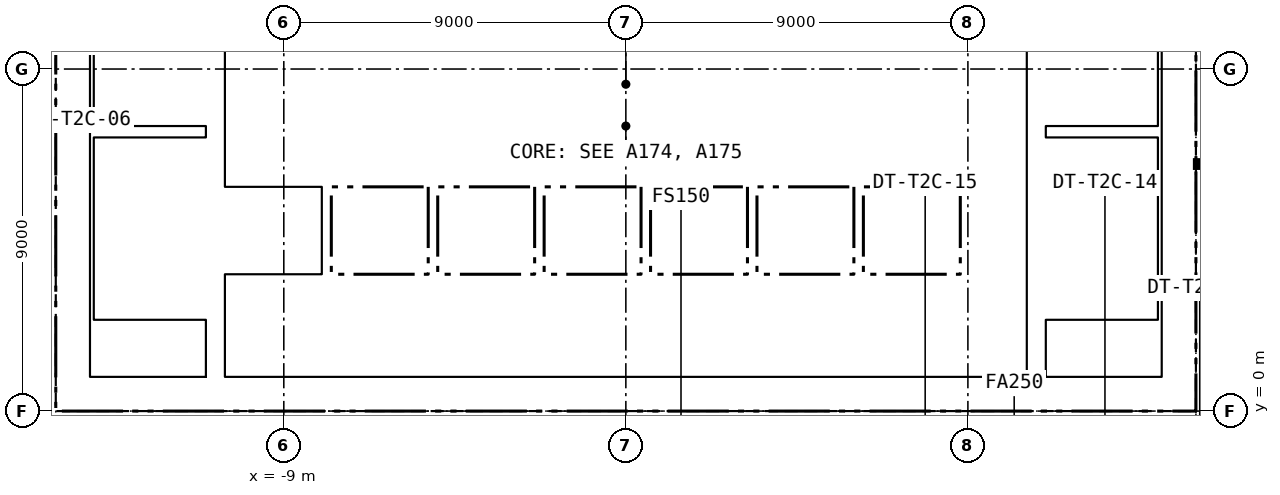
"""IFC4 building model, lengths in metres.
Left out: names, types, materials, properties, quantities, classifications, styles, units other than length and angle.
Written with IfcOpenShell. Run it as: python <this file> out.ifc"""

import sys

from ifc_helpers import new_model, si_unit, direction, frame, frame_2d, origin, place, context, subcontext, project, spatial, rectangle, extrude, element, fill, save


model = new_model("IFC4")
c1 = context("Model", 3, precision=1e-05, world=origin(), true_north=direction((0.0, 1.0)))
c2 = subcontext(c1, "Body", "Model", "MODEL_VIEW")
j1 = project(units=[si_unit("LENGTHUNIT", "METRE"), si_unit("PLANEANGLEUNIT", "RADIAN")], contexts=[c1])
p1 = place(None, origin())
s1 = spatial("IfcSite", under=j1, at=p1, CompositionType="ELEMENT")
p2 = place(p1, origin())
s2 = spatial("IfcBuilding", under=s1, at=p2, CompositionType="ELEMENT")
p3 = place(p2, frame((0.0, 0.0, 102.55)))
s3 = spatial("IfcBuildingStorey", under=s2, at=p3, CompositionType="ELEMENT", Elevation=102.55)
p4 = place(p3, frame((-15.0, 0.45, -0.15), z_axis=(0.0, 0.0, 1.0), x_axis=(1.0, 0.0, 0.0)))
e1 = element("IfcWall", 1, at=p4, inside=s3, PredefinedType="SOLIDWALL", context=c2, shape_type="SweptSolid", body=[
    extrude(rectangle(XDim=30.0, YDim=0.9, at=frame_2d((15.0, 0.0))), origin(), (0.0, 0.0, 1.0), 3.65),
])
p5 = place(p4, frame((5.8, 0.0, 0.15)))
e2 = element("IfcOpeningElement", 2, at=p5, cuts=e1, PredefinedType="OPENING", context=c2, shape_type="SweptSolid", body=[
    extrude(rectangle(XDim=2.4, YDim=2.4, at=frame_2d((1.2, 1.2))), frame((0.0, 0.46, 0.0), z_axis=(0.0, -1.0, 0.0), x_axis=(1.0, 0.0, 0.0)), (0.0, 0.0, 1.0), 0.92),
])
p6 = place(p4, frame((13.8, 0.0, 0.15)))
e3 = element("IfcOpeningElement", 3, at=p6, cuts=e1, PredefinedType="OPENING", context=c2, shape_type="SweptSolid", body=[
    extrude(rectangle(XDim=2.4, YDim=2.4, at=frame_2d((1.2, 1.2))), frame((0.0, 0.46, 0.0), z_axis=(0.0, -1.0, 0.0), x_axis=(1.0, 0.0, 0.0)), (0.0, 0.0, 1.0), 0.92),
])
p7 = place(p4, frame((21.8, 0.0, 0.15)))
e4 = element("IfcOpeningElement", 4, at=p7, cuts=e1, PredefinedType="OPENING", context=c2, shape_type="SweptSolid", body=[
    extrude(rectangle(XDim=2.4, YDim=2.4, at=frame_2d((1.2, 1.2))), frame((0.0, 0.46, 0.0), z_axis=(0.0, -1.0, 0.0), x_axis=(1.0, 0.0, 0.0)), (0.0, 0.0, 1.0), 0.92),
])
p8 = place(p4, frame((1.5, 0.0, 0.15)))
e5 = element("IfcOpeningElement", 5, at=p8, cuts=e1, PredefinedType="OPENING", context=c2, shape_type="SweptSolid", body=[
    extrude(rectangle(XDim=1.2, YDim=2.1, at=frame_2d((0.6, 1.05))), frame((0.0, 0.46, 0.0), z_axis=(0.0, -1.0, 0.0), x_axis=(1.0, 0.0, 0.0)), (0.0, 0.0, 1.0), 0.92),
])
p9 = place(p4, frame((27.3, 0.0, 0.15)))
e6 = element("IfcOpeningElement", 6, at=p9, cuts=e1, PredefinedType="OPENING", context=c2, shape_type="SweptSolid", body=[
    extrude(rectangle(XDim=1.2, YDim=2.1, at=frame_2d((0.6, 1.05))), frame((0.0, 0.46, 0.0), z_axis=(0.0, -1.0, 0.0), x_axis=(1.0, 0.0, 0.0)), (0.0, 0.0, 1.0), 0.92),
])
for number, where, z_axis, x_axis in (
    (7, (-14.55, 0.9, -0.15), (0.0, 0.0, 1.0), (0.0, 1.0, 0.0)),
    (8, (14.55, 0.9, -0.15), (0.0, 0.0, 1.0), (0.0, 1.0, 0.0)),
):
    element("IfcWall", number, at=place(p3, frame(where, z_axis=z_axis, x_axis=x_axis)), inside=s3, PredefinedType="SOLIDWALL", context=c2, shape_type="SweptSolid", body=[
        extrude(rectangle(XDim=13.2, YDim=0.9, at=frame_2d((6.6, 0.0))), origin(), (0.0, 0.0, 1.0), 3.65),
    ])
for number, where, z_axis, x_axis in (
    (9, (-10.8, 0.9, -0.15), (0.0, 0.0, 1.0), (0.0, 1.0, 0.0)),
    (10, (10.8, 0.9, -0.15), (0.0, 0.0, 1.0), (0.0, 1.0, 0.0)),
):
    element("IfcWall", number, at=place(p3, frame(where, z_axis=z_axis, x_axis=x_axis)), inside=s3, PredefinedType="SOLIDWALL", context=c2, shape_type="SweptSolid", body=[
        extrude(rectangle(XDim=13.2, YDim=0.5, at=frame_2d((6.6, 0.0))), origin(), (0.0, 0.0, 1.0), 3.65),
    ])
p10 = place(p3, frame((-10.55, 3.5, 0.0), z_axis=(0.0, 0.0, 1.0), x_axis=(1.0, 0.0, 0.0)))
e11 = element("IfcWall", 11, at=p10, inside=s3, PredefinedType="PARTITIONING", context=c2, shape_type="SweptSolid", body=[
    extrude(rectangle(XDim=21.1, YDim=0.2, at=frame_2d((10.55, 0.0))), origin(), (0.0, 0.0, 1.0), 3.5),
])
p11 = place(p10, frame((0.675, 0.0, 0.0)))
e12 = element("IfcOpeningElement", 12, at=p11, cuts=e11, PredefinedType="OPENING", context=c2, shape_type="SweptSolid", body=[
    extrude(rectangle(XDim=1.2, YDim=2.1, at=frame_2d((0.6, 1.05))), frame((0.0, 0.11, 0.0), z_axis=(0.0, -1.0, 0.0), x_axis=(1.0, 0.0, 0.0)), (0.0, 0.0, 1.0), 0.22),
])
p12 = place(p10, frame((3.475, 0.0, 0.0)))
e13 = element("IfcOpeningElement", 13, at=p12, cuts=e11, PredefinedType="OPENING", context=c2, shape_type="SweptSolid", body=[
    extrude(rectangle(XDim=1.2, YDim=2.1, at=frame_2d((0.6, 1.05))), frame((0.0, 0.11, 0.0), z_axis=(0.0, -1.0, 0.0), x_axis=(1.0, 0.0, 0.0)), (0.0, 0.0, 1.0), 0.22),
])
p13 = place(p10, frame((6.275, 0.0, 0.0)))
e14 = element("IfcOpeningElement", 14, at=p13, cuts=e11, PredefinedType="OPENING", context=c2, shape_type="SweptSolid", body=[
    extrude(rectangle(XDim=1.2, YDim=2.1, at=frame_2d((0.6, 1.05))), frame((0.0, 0.11, 0.0), z_axis=(0.0, -1.0, 0.0), x_axis=(1.0, 0.0, 0.0)), (0.0, 0.0, 1.0), 0.22),
])
p14 = place(p10, frame((9.075, 0.0, 0.0)))
e15 = element("IfcOpeningElement", 15, at=p14, cuts=e11, PredefinedType="OPENING", context=c2, shape_type="SweptSolid", body=[
    extrude(rectangle(XDim=1.2, YDim=2.1, at=frame_2d((0.6, 1.05))), frame((0.0, 0.11, 0.0), z_axis=(0.0, -1.0, 0.0), x_axis=(1.0, 0.0, 0.0)), (0.0, 0.0, 1.0), 0.22),
])
p15 = place(p10, frame((11.875, 0.0, 0.0)))
e16 = element("IfcOpeningElement", 16, at=p15, cuts=e11, PredefinedType="OPENING", context=c2, shape_type="SweptSolid", body=[
    extrude(rectangle(XDim=1.2, YDim=2.1, at=frame_2d((0.6, 1.05))), frame((0.0, 0.11, 0.0), z_axis=(0.0, -1.0, 0.0), x_axis=(1.0, 0.0, 0.0)), (0.0, 0.0, 1.0), 0.22),
])
p16 = place(p10, frame((14.675, 0.0, 0.0)))
e17 = element("IfcOpeningElement", 17, at=p16, cuts=e11, PredefinedType="OPENING", context=c2, shape_type="SweptSolid", body=[
    extrude(rectangle(XDim=1.2, YDim=2.1, at=frame_2d((0.6, 1.05))), frame((0.0, 0.11, 0.0), z_axis=(0.0, -1.0, 0.0), x_axis=(1.0, 0.0, 0.0)), (0.0, 0.0, 1.0), 0.22),
])
p17 = place(p10, frame((17.475, 0.0, 0.0)))
e18 = element("IfcOpeningElement", 18, at=p17, cuts=e11, PredefinedType="OPENING", context=c2, shape_type="SweptSolid", body=[
    extrude(rectangle(XDim=1.2, YDim=2.1, at=frame_2d((0.6, 1.05))), frame((0.0, 0.11, 0.0), z_axis=(0.0, -1.0, 0.0), x_axis=(1.0, 0.0, 0.0)), (0.0, 0.0, 1.0), 0.22),
])
p18 = place(p10, frame((19.9, 0.0, 0.0)))
e19 = element("IfcOpeningElement", 19, at=p18, cuts=e11, PredefinedType="OPENING", context=c2, shape_type="SweptSolid", body=[
    extrude(rectangle(XDim=0.9, YDim=2.1, at=frame_2d((0.45, 1.05))), frame((0.0, 0.11, 0.0), z_axis=(0.0, -1.0, 0.0), x_axis=(1.0, 0.0, 0.0)), (0.0, 0.0, 1.0), 0.22),
])
p19 = place(p3, frame((-10.55, 6.025, 0.0), z_axis=(0.0, 0.0, 1.0), x_axis=(1.0, 0.0, 0.0)))
e20 = element("IfcWall", 20, at=p19, inside=s3, PredefinedType="PARTITIONING", context=c2, shape_type="SweptSolid", body=[
    extrude(rectangle(XDim=21.1, YDim=0.25, at=frame_2d((10.55, 0.0))), origin(), (0.0, 0.0, 1.0), 3.5),
])
p20 = place(p3, frame((-4.125, 8.55, 0.0), z_axis=(0.0, 0.0, 1.0), x_axis=(1.0, 0.0, 0.0)))
e21 = element("IfcWall", 21, at=p20, inside=s3, PredefinedType="PARTITIONING", context=c2, shape_type="SweptSolid", body=[
    extrude(rectangle(XDim=14.675, YDim=0.2, at=frame_2d((7.337, 0.0))), origin(), (0.0, 0.0, 1.0), 3.5),
])
p21 = place(p20, frame((1.413, 0.0, 0.0)))
e22 = element("IfcOpeningElement", 22, at=p21, cuts=e21, PredefinedType="OPENING", context=c2, shape_type="SweptSolid", body=[
    extrude(rectangle(XDim=1.0, YDim=2.1, at=frame_2d((0.5, 1.05))), frame((0.0, 0.11, 0.0), z_axis=(0.0, -1.0, 0.0), x_axis=(1.0, 0.0, 0.0)), (0.0, 0.0, 1.0), 0.22),
])
p22 = place(p20, frame((5.0, 0.0, 0.0)))
e23 = element("IfcOpeningElement", 23, at=p22, cuts=e21, PredefinedType="OPENING", context=c2, shape_type="SweptSolid", body=[
    extrude(rectangle(XDim=1.0, YDim=2.1, at=frame_2d((0.5, 1.05))), frame((0.0, 0.11, 0.0), z_axis=(0.0, -1.0, 0.0), x_axis=(1.0, 0.0, 0.0)), (0.0, 0.0, 1.0), 0.22),
])
p23 = place(p20, frame((9.613, 0.0, 0.0)))
e24 = element("IfcOpeningElement", 24, at=p23, cuts=e21, PredefinedType="OPENING", context=c2, shape_type="SweptSolid", body=[
    extrude(rectangle(XDim=1.0, YDim=2.1, at=frame_2d((0.5, 1.05))), frame((0.0, 0.11, 0.0), z_axis=(0.0, -1.0, 0.0), x_axis=(1.0, 0.0, 0.0)), (0.0, 0.0, 1.0), 0.22),
])
p24 = place(p20, frame((13.475, 0.0, 0.0)))
e25 = element("IfcOpeningElement", 25, at=p24, cuts=e21, PredefinedType="OPENING", context=c2, shape_type="SweptSolid", body=[
    extrude(rectangle(XDim=0.9, YDim=2.1, at=frame_2d((0.45, 1.05))), frame((0.0, 0.11, 0.0), z_axis=(0.0, -1.0, 0.0), x_axis=(1.0, 0.0, 0.0)), (0.0, 0.0, 1.0), 0.22),
])
p25 = place(p3, frame((-4.125, 6.15, 0.0), z_axis=(0.0, 0.0, 1.0), x_axis=(0.0, 1.0, 0.0)))
e26 = element("IfcWall", 26, at=p25, inside=s3, PredefinedType="PARTITIONING", context=c2, shape_type="SweptSolid", body=[
    extrude(rectangle(XDim=4.95, YDim=0.25, at=frame_2d((2.475, 0.0))), origin(), (0.0, 0.0, 1.0), 3.5),
])
p26 = place(p25, frame((3.125, 0.0, 0.0)))
e27 = element("IfcOpeningElement", 27, at=p26, cuts=e26, PredefinedType="OPENING", context=c2, shape_type="SweptSolid", body=[
    extrude(rectangle(XDim=1.2, YDim=2.1, at=frame_2d((0.6, 1.05))), frame((0.0, 0.135, 0.0), z_axis=(0.0, -1.0, 0.0), x_axis=(1.0, 0.0, 0.0)), (0.0, 0.0, 1.0), 0.27),
])
for number, where, z_axis, x_axis in (
    (28, (-7.875, 3.6, 0.0), (0.0, 0.0, 1.0), (0.0, 1.0, 0.0)),
    (29, (-5.075, 3.6, 0.0), (0.0, 0.0, 1.0), (0.0, 1.0, 0.0)),
    (30, (-2.275, 3.6, 0.0), (0.0, 0.0, 1.0), (0.0, 1.0, 0.0)),
    (31, (0.525, 3.6, 0.0), (0.0, 0.0, 1.0), (0.0, 1.0, 0.0)),
    (32, (3.325, 3.6, 0.0), (0.0, 0.0, 1.0), (0.0, 1.0, 0.0)),
    (33, (6.125, 3.6, 0.0), (0.0, 0.0, 1.0), (0.0, 1.0, 0.0)),
    (34, (8.925, 3.6, 0.0), (0.0, 0.0, 1.0), (0.0, 1.0, 0.0)),
):
    element("IfcWall", number, at=place(p3, frame(where, z_axis=z_axis, x_axis=x_axis)), inside=s3, PredefinedType="PARTITIONING", context=c2, shape_type="SweptSolid", body=[
        extrude(rectangle(XDim=2.3, YDim=0.25, at=frame_2d((1.15, 0.0))), origin(), (0.0, 0.0, 1.0), 3.5),
    ])
for number, where, z_axis, x_axis in (
    (35, (-0.35, 6.15, 0.0), (0.0, 0.0, 1.0), (0.0, 1.0, 0.0)),
    (36, (3.1, 6.15, 0.0), (0.0, 0.0, 1.0), (0.0, 1.0, 0.0)),
):
    element("IfcWall", number, at=place(p3, frame(where, z_axis=z_axis, x_axis=x_axis)), inside=s3, PredefinedType="PARTITIONING", context=c2, shape_type="SweptSolid", body=[
        extrude(rectangle(XDim=2.3, YDim=0.15, at=frame_2d((1.15, 0.0))), origin(), (0.0, 0.0, 1.0), 3.5),
    ])
p27 = place(p3, frame((8.925, 6.15, 0.0), z_axis=(0.0, 0.0, 1.0), x_axis=(0.0, 1.0, 0.0)))
e37 = element("IfcWall", 37, at=p27, inside=s3, PredefinedType="PARTITIONING", context=c2, shape_type="SweptSolid", body=[
    extrude(rectangle(XDim=2.3, YDim=0.25, at=frame_2d((1.15, 0.0))), origin(), (0.0, 0.0, 1.0), 3.5),
])
p28 = place(p3, frame((-14.0, 7.35, 0.0), z_axis=(0.0, 0.0, 1.0), x_axis=(1.0, 0.0, 0.0)))
e38 = element("IfcWall", 38, at=p28, inside=s3, PredefinedType="SOLIDWALL", context=c2, shape_type="SweptSolid", body=[
    extrude(rectangle(XDim=2.95, YDim=0.3, at=frame_2d((1.475, 0.0))), origin(), (0.0, 0.0, 1.0), 3.5),
])
p29 = place(p3, frame((-14.05, 0.9, 0.0), z_axis=(0.0, 0.0, 1.0), x_axis=(0.0, 1.0, 0.0)))
e39 = element("IfcWall", 39, at=p29, inside=s3, PredefinedType="SOLIDWALL", context=c2, shape_type="SweptSolid", body=[
    extrude(rectangle(XDim=13.2, YDim=0.1, at=frame_2d((6.6, 0.0))), origin(), (0.0, 0.0, 1.0), 3.5),
])
p30 = place(p3, frame((11.05, 7.35, 0.0), z_axis=(0.0, 0.0, 1.0), x_axis=(1.0, 0.0, 0.0)))
e40 = element("IfcWall", 40, at=p30, inside=s3, PredefinedType="SOLIDWALL", context=c2, shape_type="SweptSolid", body=[
    extrude(rectangle(XDim=2.95, YDim=0.3, at=frame_2d((1.475, 0.0))), origin(), (0.0, 0.0, 1.0), 3.5),
])
p31 = place(p3, frame((14.05, 0.9, 0.0), z_axis=(0.0, 0.0, 1.0), x_axis=(0.0, 1.0, 0.0)))
e41 = element("IfcWall", 41, at=p31, inside=s3, PredefinedType="SOLIDWALL", context=c2, shape_type="SweptSolid", body=[
    extrude(rectangle(XDim=13.2, YDim=0.1, at=frame_2d((6.6, 0.0))), origin(), (0.0, 0.0, 1.0), 3.5),
])
p32 = place(p3, frame((15.0, 6.5, 0.0), z_axis=(0.0, 0.0, 1.0), x_axis=(1.0, 0.0, 0.0)))
e42 = element("IfcWall", 42, at=p32, inside=s3, PredefinedType="PARTITIONING", context=c2, shape_type="SweptSolid", body=[
    extrude(rectangle(XDim=2.223, YDim=0.15, at=frame_2d((1.111, 0.0))), origin(), (0.0, 0.0, 1.0), 2.741),
])
p33 = place(p26, origin())
e43 = element("IfcDoor", 43, at=p33, inside=s3, OperationType="SINGLE_SWING_LEFT", PredefinedType="DOOR", context=c2, shape_type="SweptSolid", body=[
    extrude(rectangle(XDim=1.2, YDim=2.1, at=frame_2d((0.6, 1.05))), frame((0.0, 0.025, 0.0), z_axis=(0.0, -1.0, 0.0), x_axis=(1.0, 0.0, 0.0)), (0.0, 0.0, 1.0), 0.05),
])
fill(e27, e43)
p34 = place(p11, origin())
e44 = element("IfcDoor", 44, at=p34, inside=s3, OperationType="DOUBLE_DOOR_SLIDING", PredefinedType="DOOR", context=c2, shape_type="SweptSolid", body=[
    extrude(rectangle(XDim=1.2, YDim=2.1, at=frame_2d((0.6, 1.05))), frame((0.0, 0.025, 0.0), z_axis=(0.0, -1.0, 0.0), x_axis=(1.0, 0.0, 0.0)), (0.0, 0.0, 1.0), 0.05),
])
fill(e12, e44)
p35 = place(p12, origin())
e45 = element("IfcDoor", 45, at=p35, inside=s3, OperationType="DOUBLE_DOOR_SLIDING", PredefinedType="DOOR", context=c2, shape_type="SweptSolid", body=[
    extrude(rectangle(XDim=1.2, YDim=2.1, at=frame_2d((0.6, 1.05))), frame((0.0, 0.025, 0.0), z_axis=(0.0, -1.0, 0.0), x_axis=(1.0, 0.0, 0.0)), (0.0, 0.0, 1.0), 0.05),
])
fill(e13, e45)
p36 = place(p13, origin())
e46 = element("IfcDoor", 46, at=p36, inside=s3, OperationType="DOUBLE_DOOR_SLIDING", PredefinedType="DOOR", context=c2, shape_type="SweptSolid", body=[
    extrude(rectangle(XDim=1.2, YDim=2.1, at=frame_2d((0.6, 1.05))), frame((0.0, 0.025, 0.0), z_axis=(0.0, -1.0, 0.0), x_axis=(1.0, 0.0, 0.0)), (0.0, 0.0, 1.0), 0.05),
])
fill(e14, e46)
p37 = place(p14, origin())
e47 = element("IfcDoor", 47, at=p37, inside=s3, OperationType="DOUBLE_DOOR_SLIDING", PredefinedType="DOOR", context=c2, shape_type="SweptSolid", body=[
    extrude(rectangle(XDim=1.2, YDim=2.1, at=frame_2d((0.6, 1.05))), frame((0.0, 0.025, 0.0), z_axis=(0.0, -1.0, 0.0), x_axis=(1.0, 0.0, 0.0)), (0.0, 0.0, 1.0), 0.05),
])
fill(e15, e47)
p38 = place(p15, origin())
e48 = element("IfcDoor", 48, at=p38, inside=s3, OperationType="DOUBLE_DOOR_SLIDING", PredefinedType="DOOR", context=c2, shape_type="SweptSolid", body=[
    extrude(rectangle(XDim=1.2, YDim=2.1, at=frame_2d((0.6, 1.05))), frame((0.0, 0.025, 0.0), z_axis=(0.0, -1.0, 0.0), x_axis=(1.0, 0.0, 0.0)), (0.0, 0.0, 1.0), 0.05),
])
fill(e16, e48)
p39 = place(p16, origin())
e49 = element("IfcDoor", 49, at=p39, inside=s3, OperationType="DOUBLE_DOOR_SLIDING", PredefinedType="DOOR", context=c2, shape_type="SweptSolid", body=[
    extrude(rectangle(XDim=1.2, YDim=2.1, at=frame_2d((0.6, 1.05))), frame((0.0, 0.025, 0.0), z_axis=(0.0, -1.0, 0.0), x_axis=(1.0, 0.0, 0.0)), (0.0, 0.0, 1.0), 0.05),
])
fill(e17, e49)
p40 = place(p17, origin())
e50 = element("IfcDoor", 50, at=p40, inside=s3, OperationType="DOUBLE_DOOR_SLIDING", PredefinedType="DOOR", context=c2, shape_type="SweptSolid", body=[
    extrude(rectangle(XDim=1.2, YDim=2.1, at=frame_2d((0.6, 1.05))), frame((0.0, 0.025, 0.0), z_axis=(0.0, -1.0, 0.0), x_axis=(1.0, 0.0, 0.0)), (0.0, 0.0, 1.0), 0.05),
])
fill(e18, e50)
p41 = place(p18, origin())
e51 = element("IfcDoor", 51, at=p41, inside=s3, OperationType="SINGLE_SWING_RIGHT", PredefinedType="DOOR", context=c2, shape_type="SweptSolid", body=[
    extrude(rectangle(XDim=0.9, YDim=2.1, at=frame_2d((0.45, 1.05))), frame((0.0, 0.025, 0.0), z_axis=(0.0, -1.0, 0.0), x_axis=(1.0, 0.0, 0.0)), (0.0, 0.0, 1.0), 0.05),
])
fill(e19, e51)
p42 = place(p21, origin())
e52 = element("IfcDoor", 52, at=p42, inside=s3, OperationType="SINGLE_SWING_LEFT", PredefinedType="DOOR", context=c2, shape_type="SweptSolid", body=[
    extrude(rectangle(XDim=1.0, YDim=2.1, at=frame_2d((0.5, 1.05))), frame((0.0, 0.025, 0.0), z_axis=(0.0, -1.0, 0.0), x_axis=(1.0, 0.0, 0.0)), (0.0, 0.0, 1.0), 0.05),
])
fill(e22, e52)
p43 = place(p22, origin())
e53 = element("IfcDoor", 53, at=p43, inside=s3, OperationType="SINGLE_SWING_RIGHT", PredefinedType="DOOR", context=c2, shape_type="SweptSolid", body=[
    extrude(rectangle(XDim=1.0, YDim=2.1, at=frame_2d((0.5, 1.05))), frame((0.0, 0.025, 0.0), z_axis=(0.0, -1.0, 0.0), x_axis=(1.0, 0.0, 0.0)), (0.0, 0.0, 1.0), 0.05),
])
fill(e23, e53)
p44 = place(p23, origin())
e54 = element("IfcDoor", 54, at=p44, inside=s3, OperationType="SINGLE_SWING_LEFT", PredefinedType="DOOR", context=c2, shape_type="SweptSolid", body=[
    extrude(rectangle(XDim=1.0, YDim=2.1, at=frame_2d((0.5, 1.05))), frame((0.0, 0.025, 0.0), z_axis=(0.0, -1.0, 0.0), x_axis=(1.0, 0.0, 0.0)), (0.0, 0.0, 1.0), 0.05),
])
fill(e24, e54)
p45 = place(p24, origin())
e55 = element("IfcDoor", 55, at=p45, inside=s3, OperationType="SINGLE_SWING_RIGHT", PredefinedType="DOOR", context=c2, shape_type="SweptSolid", body=[
    extrude(rectangle(XDim=0.9, YDim=2.1, at=frame_2d((0.45, 1.05))), frame((0.0, 0.025, 0.0), z_axis=(0.0, -1.0, 0.0), x_axis=(1.0, 0.0, 0.0)), (0.0, 0.0, 1.0), 0.05),
])
fill(e25, e55)
p46 = place(p5, origin())
e56 = element("IfcDoor", 56, at=p46, inside=s3, OperationType="DOUBLE_DOOR_DOUBLE_SWING", PredefinedType="DOOR", context=c2, shape_type="SweptSolid", body=[
    extrude(rectangle(XDim=2.4, YDim=2.4, at=frame_2d((1.2, 1.2))), frame((0.0, 0.025, 0.0), z_axis=(0.0, -1.0, 0.0), x_axis=(1.0, 0.0, 0.0)), (0.0, 0.0, 1.0), 0.05),
])
fill(e2, e56)
p47 = place(p6, origin())
e57 = element("IfcDoor", 57, at=p47, inside=s3, OperationType="DOUBLE_DOOR_DOUBLE_SWING", PredefinedType="DOOR", context=c2, shape_type="SweptSolid", body=[
    extrude(rectangle(XDim=2.4, YDim=2.4, at=frame_2d((1.2, 1.2))), frame((0.0, 0.025, 0.0), z_axis=(0.0, -1.0, 0.0), x_axis=(1.0, 0.0, 0.0)), (0.0, 0.0, 1.0), 0.05),
])
fill(e3, e57)
p48 = place(p7, origin())
e58 = element("IfcDoor", 58, at=p48, inside=s3, OperationType="DOUBLE_DOOR_DOUBLE_SWING", PredefinedType="DOOR", context=c2, shape_type="SweptSolid", body=[
    extrude(rectangle(XDim=2.4, YDim=2.4, at=frame_2d((1.2, 1.2))), frame((0.0, 0.025, 0.0), z_axis=(0.0, -1.0, 0.0), x_axis=(1.0, 0.0, 0.0)), (0.0, 0.0, 1.0), 0.05),
])
fill(e4, e58)
p49 = place(p8, origin())
e59 = element("IfcDoor", 59, at=p49, inside=s3, OperationType="SINGLE_SWING_LEFT", PredefinedType="DOOR", context=c2, shape_type="SweptSolid", body=[
    extrude(rectangle(XDim=1.2, YDim=2.1, at=frame_2d((0.6, 1.05))), frame((0.0, 0.025, 0.0), z_axis=(0.0, -1.0, 0.0), x_axis=(1.0, 0.0, 0.0)), (0.0, 0.0, 1.0), 0.05),
])
fill(e5, e59)
p50 = place(p9, origin())
e60 = element("IfcDoor", 60, at=p50, inside=s3, OperationType="SINGLE_SWING_RIGHT", PredefinedType="DOOR", context=c2, shape_type="SweptSolid", body=[
    extrude(rectangle(XDim=1.2, YDim=2.1, at=frame_2d((0.6, 1.05))), frame((0.0, 0.025, 0.0), z_axis=(0.0, -1.0, 0.0), x_axis=(1.0, 0.0, 0.0)), (0.0, 0.0, 1.0), 0.05),
])
fill(e6, e60)
save(model, sys.argv[1])
